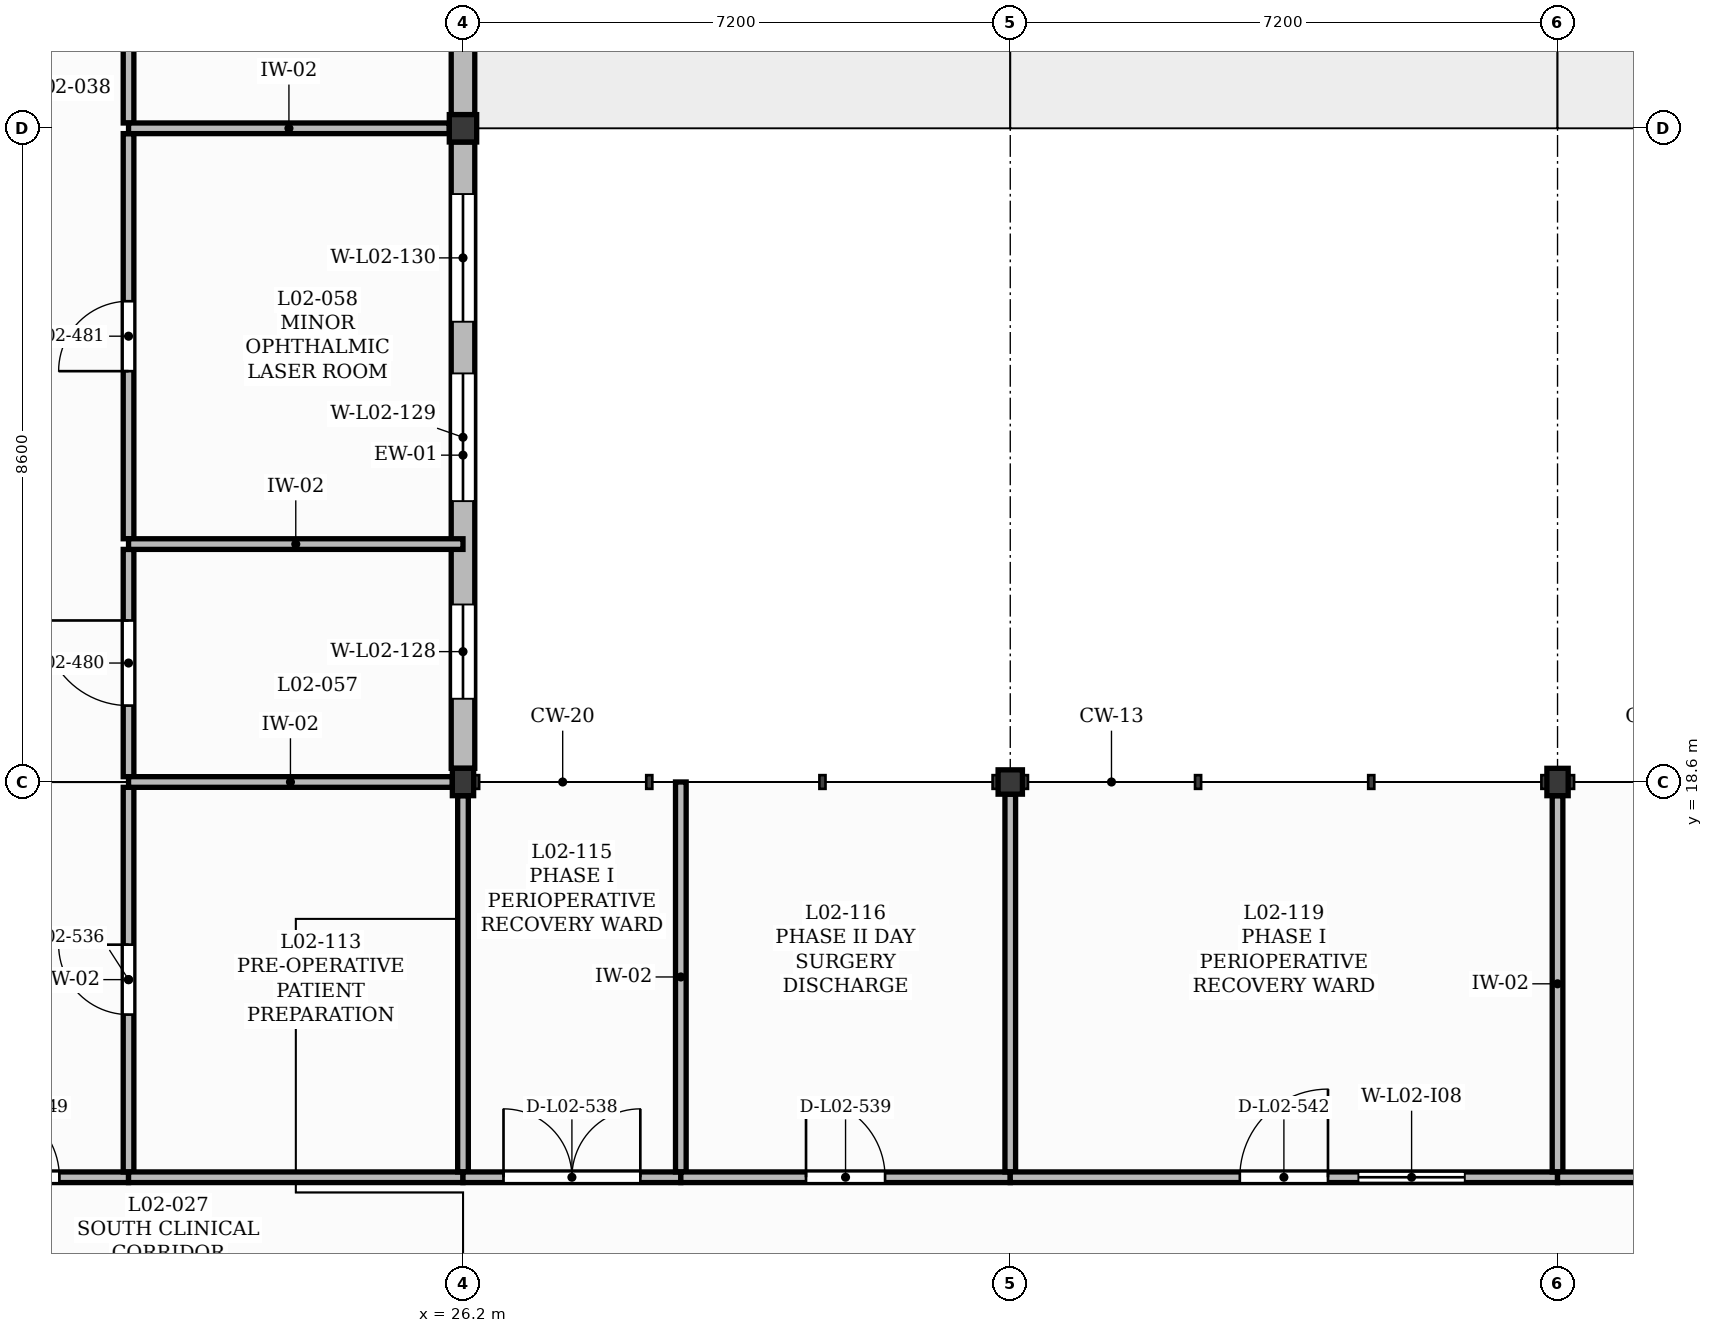
"""IFC4 building model, lengths in metres.
Left out: names, types, materials, properties, quantities, classifications, styles, units other than length and angle.
Written with IfcOpenShell. Run it as: python <this file> out.ifc"""

import sys

from ifc_helpers import new_model, si_unit, direction, frame, frame_2d, origin, origin_2d, place, context, subcontext, project, spatial, rectangle, extrude, element, fill, save


model = new_model("IFC4")
c1 = context("Model", 3, precision=1e-05, world=origin(), true_north=direction((0.0, 1.0)))
c2 = subcontext(c1, "Body", "Model", "MODEL_VIEW")
j1 = project(units=[si_unit("LENGTHUNIT", "METRE"), si_unit("PLANEANGLEUNIT", "RADIAN")], contexts=[c1])
p1 = place(None, origin())
s1 = spatial("IfcSite", under=j1, at=p1, CompositionType="ELEMENT")
p2 = place(p1, origin())
s2 = spatial("IfcBuilding", under=s1, at=p2, CompositionType="ELEMENT")
p3 = place(p2, frame((0.0, 0.0, 9.0)))
s3 = spatial("IfcBuildingStorey", under=s2, at=p3, CompositionType="ELEMENT", Elevation=9.0)
p4 = place(p3, frame((26.2, 18.6, 0.0), z_axis=(0.0, 0.0, 1.0), x_axis=(1.0, 0.0, 0.0)))
e1 = element("IfcColumn", 1, at=p4, inside=s3, PredefinedType="COLUMN", context=c2, shape_type="SweptSolid", body=[
    extrude(rectangle(XDim=0.28, YDim=0.36, at=origin_2d()), origin(), (0.0, 0.0, 1.0), 3.95),
])
p5 = place(p3, frame((26.2, 27.2, 0.0), z_axis=(0.0, 0.0, 1.0), x_axis=(1.0, 0.0, 0.0)))
e2 = element("IfcColumn", 2, at=p5, inside=s3, PredefinedType="COLUMN", context=c2, shape_type="SweptSolid", body=[
    extrude(rectangle(XDim=0.36, YDim=0.36, at=origin_2d()), origin(), (0.0, 0.0, 1.0), 3.95),
])
p6 = place(p3, frame((33.4, 18.6, 0.0), z_axis=(0.0, 0.0, 1.0), x_axis=(1.0, 0.0, 0.0)))
e3 = element("IfcColumn", 3, at=p6, inside=s3, PredefinedType="COLUMN", context=c2, shape_type="SweptSolid", body=[
    extrude(rectangle(XDim=0.32, YDim=0.32, at=origin_2d()), origin(), (0.0, 0.0, 1.0), 3.95),
])
p7 = place(p3, frame((40.6, 18.6, 0.0), z_axis=(0.0, 0.0, 1.0), x_axis=(1.0, 0.0, 0.0)))
e4 = element("IfcColumn", 4, at=p7, inside=s3, PredefinedType="COLUMN", context=c2, shape_type="SweptSolid", body=[
    extrude(rectangle(XDim=0.28, YDim=0.36, at=origin_2d()), origin(), (0.0, 0.0, 1.0), 3.95),
])
p8 = place(p3, frame((26.2, 18.78, 0.0), z_axis=(0.0, 0.0, 1.0), x_axis=(0.0, 1.0, 0.0)))
e5 = element("IfcWall", 5, at=p8, inside=s3, PredefinedType="SOLIDWALL", context=c2, shape_type="SweptSolid", body=[
    extrude(rectangle(XDim=8.24, YDim=0.31, at=frame_2d((4.12, 0.0))), origin(), (0.0, 0.0, 1.0), 3.49),
])
p9 = place(p8, frame((0.915, 0.0, 1.0)))
e6 = element("IfcOpeningElement", 6, at=p9, cuts=e5, PredefinedType="OPENING", context=c2, shape_type="SweptSolid", body=[
    extrude(rectangle(XDim=1.24, YDim=1.8, at=frame_2d((0.62, 0.9))), frame((0.0, 0.165, 0.0), z_axis=(0.0, -1.0, 0.0), x_axis=(1.0, 0.0, 0.0)), (0.0, 0.0, 1.0), 0.33),
])
p10 = place(p8, frame((3.515, 0.0, 1.5)))
e7 = element("IfcOpeningElement", 7, at=p10, cuts=e5, PredefinedType="OPENING", context=c2, shape_type="SweptSolid", body=[
    extrude(rectangle(XDim=1.68, YDim=1.25, at=frame_2d((0.84, 0.625))), frame((0.0, 0.165, 0.0), z_axis=(0.0, -1.0, 0.0), x_axis=(1.0, 0.0, 0.0)), (0.0, 0.0, 1.0), 0.33),
])
p11 = place(p8, frame((5.875, 0.0, 1.5)))
e8 = element("IfcOpeningElement", 8, at=p11, cuts=e5, PredefinedType="OPENING", context=c2, shape_type="SweptSolid", body=[
    extrude(rectangle(XDim=1.68, YDim=1.25, at=frame_2d((0.84, 0.625))), frame((0.0, 0.165, 0.0), z_axis=(0.0, -1.0, 0.0), x_axis=(1.0, 0.0, 0.0)), (0.0, 0.0, 1.0), 0.33),
])
p12 = place(p3, frame((26.2, 27.38, 0.0), z_axis=(0.0, 0.0, 1.0), x_axis=(0.0, 1.0, 0.0)))
e9 = element("IfcWall", 9, at=p12, inside=s3, PredefinedType="SOLIDWALL", context=c2, shape_type="SweptSolid", body=[
    extrude(rectangle(XDim=9.24, YDim=0.31, at=frame_2d((4.62, 0.0))), origin(), (0.0, 0.0, 1.0), 3.49),
])
p13 = place(p3, frame((19.0, 13.4, 0.0), z_axis=(0.0, 0.0, 1.0), x_axis=(1.0, 0.0, 0.0)))
e10 = element("IfcWall", 10, at=p13, inside=s3, PredefinedType="PARTITIONING", context=c2, shape_type="SweptSolid", body=[
    extrude(rectangle(XDim=2.8, YDim=0.14, at=frame_2d((1.4, 0.0))), origin(), (0.0, 0.0, 1.0), 3.96),
])
p14 = place(p13, frame((0.91, 0.0, 0.0)))
e11 = element("IfcOpeningElement", 11, at=p14, cuts=e10, PredefinedType="OPENING", context=c2, shape_type="SweptSolid", body=[
    extrude(rectangle(XDim=0.98, YDim=2.15, at=frame_2d((0.49, 1.075))), frame((0.0, 0.08, 0.0), z_axis=(0.0, -1.0, 0.0), x_axis=(1.0, 0.0, 0.0)), (0.0, 0.0, 1.0), 0.16),
])
p15 = place(p3, frame((21.8, 13.47, 0.0), z_axis=(0.0, 0.0, 1.0), x_axis=(0.0, 1.0, 0.0)))
e12 = element("IfcWall", 12, at=p15, inside=s3, PredefinedType="PARTITIONING", context=c2, shape_type="SweptSolid", body=[
    extrude(rectangle(XDim=5.06, YDim=0.14, at=frame_2d((2.53, 0.0))), origin(), (0.0, 0.0, 1.0), 3.91),
])
p16 = place(p15, frame((2.07, 0.0, 0.0)))
e13 = element("IfcOpeningElement", 13, at=p16, cuts=e12, PredefinedType="OPENING", context=c2, shape_type="SweptSolid", body=[
    extrude(rectangle(XDim=0.92, YDim=2.1, at=frame_2d((0.46, 1.05))), frame((0.0, 0.08, 0.0), z_axis=(0.0, -1.0, 0.0), x_axis=(1.0, 0.0, 0.0)), (0.0, 0.0, 1.0), 0.16),
])
p17 = place(p3, frame((21.8, 13.4, 0.0), z_axis=(0.0, 0.0, 1.0), x_axis=(1.0, 0.0, 0.0)))
e14 = element("IfcWall", 14, at=p17, inside=s3, PredefinedType="PARTITIONING", context=c2, shape_type="SweptSolid", body=[
    extrude(rectangle(XDim=4.4, YDim=0.14, at=frame_2d((2.2, 0.0))), origin(), (0.0, 0.0, 1.0), 3.91),
])
p18 = place(p3, frame((21.8, 18.67, 0.0), z_axis=(0.0, 0.0, 1.0), x_axis=(0.0, 1.0, 0.0)))
e15 = element("IfcWall", 15, at=p18, inside=s3, PredefinedType="PARTITIONING", context=c2, shape_type="SweptSolid", body=[
    extrude(rectangle(XDim=2.99, YDim=0.14, at=frame_2d((1.495, 0.0))), origin(), (0.0, 0.0, 1.0), 3.96),
])
p19 = place(p18, frame((0.935, 0.0, 0.0)))
e16 = element("IfcOpeningElement", 16, at=p19, cuts=e15, PredefinedType="OPENING", context=c2, shape_type="SweptSolid", body=[
    extrude(rectangle(XDim=1.12, YDim=2.15, at=frame_2d((0.56, 1.075))), frame((0.0, 0.08, 0.0), z_axis=(0.0, -1.0, 0.0), x_axis=(1.0, 0.0, 0.0)), (0.0, 0.0, 1.0), 0.16),
])
p20 = place(p3, frame((21.8, 18.6, 0.0), z_axis=(0.0, 0.0, 1.0), x_axis=(1.0, 0.0, 0.0)))
e17 = element("IfcWall", 17, at=p20, inside=s3, PredefinedType="PARTITIONING", context=c2, shape_type="SweptSolid", body=[
    extrude(rectangle(XDim=4.26, YDim=0.14, at=frame_2d((2.13, 0.0))), origin(), (0.0, 0.0, 1.0), 3.49),
])
p21 = place(p3, frame((21.8, 21.8, 0.0), z_axis=(0.0, 0.0, 1.0), x_axis=(0.0, 1.0, 0.0)))
e18 = element("IfcWall", 18, at=p21, inside=s3, PredefinedType="PARTITIONING", context=c2, shape_type="SweptSolid", body=[
    extrude(rectangle(XDim=5.33, YDim=0.14, at=frame_2d((2.665, 0.0))), origin(), (0.0, 0.0, 1.0), 3.96),
])
p22 = place(p21, frame((2.205, 0.0, 0.0)))
e19 = element("IfcOpeningElement", 19, at=p22, cuts=e18, PredefinedType="OPENING", context=c2, shape_type="SweptSolid", body=[
    extrude(rectangle(XDim=0.92, YDim=2.1, at=frame_2d((0.46, 1.05))), frame((0.0, 0.08, 0.0), z_axis=(0.0, -1.0, 0.0), x_axis=(1.0, 0.0, 0.0)), (0.0, 0.0, 1.0), 0.16),
])
p23 = place(p3, frame((21.8, 21.73, 0.0), z_axis=(0.0, 0.0, 1.0), x_axis=(1.0, 0.0, 0.0)))
e20 = element("IfcWall", 20, at=p23, inside=s3, PredefinedType="PARTITIONING", context=c2, shape_type="SweptSolid", body=[
    extrude(rectangle(XDim=4.4, YDim=0.14, at=frame_2d((2.2, 0.0))), origin(), (0.0, 0.0, 1.0), 3.96),
])
p24 = place(p3, frame((21.8, 27.27, 0.0), z_axis=(0.0, 0.0, 1.0), x_axis=(0.0, 1.0, 0.0)))
e21 = element("IfcWall", 21, at=p24, inside=s3, PredefinedType="PARTITIONING", context=c2, shape_type="SweptSolid", body=[
    extrude(rectangle(XDim=5.476, YDim=0.14, at=frame_2d((2.738, 0.0))), origin(), (0.0, 0.0, 1.0), 3.96),
])
p25 = place(p24, frame((2.158, 0.0, 0.0)))
e22 = element("IfcOpeningElement", 22, at=p25, cuts=e21, PredefinedType="OPENING", context=c2, shape_type="SweptSolid", body=[
    extrude(rectangle(XDim=1.16, YDim=2.1, at=frame_2d((0.58, 1.05))), frame((0.0, 0.08, 0.0), z_axis=(0.0, -1.0, 0.0), x_axis=(1.0, 0.0, 0.0)), (0.0, 0.0, 1.0), 0.16),
])
p26 = place(p3, frame((21.8, 27.2, 0.0), z_axis=(0.0, 0.0, 1.0), x_axis=(1.0, 0.0, 0.0)))
e23 = element("IfcWall", 23, at=p26, inside=s3, PredefinedType="PARTITIONING", context=c2, shape_type="SweptSolid", body=[
    extrude(rectangle(XDim=4.22, YDim=0.14, at=frame_2d((2.11, 0.0))), origin(), (0.0, 0.0, 1.0), 3.49),
])
p27 = place(p3, frame((26.2, 13.47, 0.0), z_axis=(0.0, 0.0, 1.0), x_axis=(0.0, 1.0, 0.0)))
e24 = element("IfcWall", 24, at=p27, inside=s3, PredefinedType="PARTITIONING", context=c2, shape_type="SweptSolid", body=[
    extrude(rectangle(XDim=4.95, YDim=0.14, at=frame_2d((2.475, 0.0))), origin(), (0.0, 0.0, 1.0), 3.49),
])
p28 = place(p3, frame((26.2, 13.4, 0.0), z_axis=(0.0, 0.0, 1.0), x_axis=(1.0, 0.0, 0.0)))
e25 = element("IfcWall", 25, at=p28, inside=s3, PredefinedType="PARTITIONING", context=c2, shape_type="SweptSolid", body=[
    extrude(rectangle(XDim=2.866, YDim=0.14, at=frame_2d((1.433, 0.0))), origin(), (0.0, 0.0, 1.0), 3.91),
])
p29 = place(p28, frame((0.533, 0.0, 0.0)))
e26 = element("IfcOpeningElement", 26, at=p29, cuts=e25, PredefinedType="OPENING", context=c2, shape_type="SweptSolid", body=[
    extrude(rectangle(XDim=1.8, YDim=2.3, at=frame_2d((0.9, 1.15))), frame((0.0, 0.08, 0.0), z_axis=(0.0, -1.0, 0.0), x_axis=(1.0, 0.0, 0.0)), (0.0, 0.0, 1.0), 0.16),
])
p30 = place(p3, frame((29.066, 13.47, 0.0), z_axis=(0.0, 0.0, 1.0), x_axis=(0.0, 1.0, 0.0)))
e27 = element("IfcWall", 27, at=p30, inside=s3, PredefinedType="PARTITIONING", context=c2, shape_type="SweptSolid", body=[
    extrude(rectangle(XDim=5.13, YDim=0.14, at=frame_2d((2.565, 0.0))), origin(), (0.0, 0.0, 1.0), 3.91),
])
p31 = place(p3, frame((29.066, 13.4, 0.0), z_axis=(0.0, 0.0, 1.0), x_axis=(1.0, 0.0, 0.0)))
e28 = element("IfcWall", 28, at=p31, inside=s3, PredefinedType="PARTITIONING", context=c2, shape_type="SweptSolid", body=[
    extrude(rectangle(XDim=4.334, YDim=0.14, at=frame_2d((2.167, 0.0))), origin(), (0.0, 0.0, 1.0), 3.91),
])
p32 = place(p31, frame((1.647, 0.0, 0.0)))
e29 = element("IfcOpeningElement", 29, at=p32, cuts=e28, PredefinedType="OPENING", context=c2, shape_type="SweptSolid", body=[
    extrude(rectangle(XDim=1.04, YDim=2.1, at=frame_2d((0.52, 1.05))), frame((0.0, 0.08, 0.0), z_axis=(0.0, -1.0, 0.0), x_axis=(1.0, 0.0, 0.0)), (0.0, 0.0, 1.0), 0.16),
])
p33 = place(p3, frame((33.4, 13.47, 0.0), z_axis=(0.0, 0.0, 1.0), x_axis=(0.0, 1.0, 0.0)))
e30 = element("IfcWall", 30, at=p33, inside=s3, PredefinedType="PARTITIONING", context=c2, shape_type="SweptSolid", body=[
    extrude(rectangle(XDim=4.97, YDim=0.14, at=frame_2d((2.485, 0.0))), origin(), (0.0, 0.0, 1.0), 3.49),
])
p34 = place(p3, frame((33.4, 13.4, 0.0), z_axis=(0.0, 0.0, 1.0), x_axis=(1.0, 0.0, 0.0)))
e31 = element("IfcWall", 31, at=p34, inside=s3, PredefinedType="PARTITIONING", context=c2, shape_type="SweptSolid", body=[
    extrude(rectangle(XDim=7.2, YDim=0.14, at=frame_2d((3.6, 0.0))), origin(), (0.0, 0.0, 1.0), 3.91),
])
p35 = place(p34, frame((3.02, 0.0, 0.0)))
e32 = element("IfcOpeningElement", 32, at=p35, cuts=e31, PredefinedType="OPENING", context=c2, shape_type="SweptSolid", body=[
    extrude(rectangle(XDim=1.16, YDim=2.1, at=frame_2d((0.58, 1.05))), frame((0.0, 0.08, 0.0), z_axis=(0.0, -1.0, 0.0), x_axis=(1.0, 0.0, 0.0)), (0.0, 0.0, 1.0), 0.16),
])
p36 = place(p34, frame((4.58, 0.0, 1.05)))
e33 = element("IfcOpeningElement", 33, at=p36, cuts=e31, PredefinedType="OPENING", context=c2, shape_type="SweptSolid", body=[
    extrude(rectangle(XDim=1.4, YDim=1.1, at=frame_2d((0.7, 0.55))), frame((0.0, 0.08, 0.0), z_axis=(0.0, -1.0, 0.0), x_axis=(1.0, 0.0, 0.0)), (0.0, 0.0, 1.0), 0.16),
])
p37 = place(p3, frame((40.6, 13.47, 0.0), z_axis=(0.0, 0.0, 1.0), x_axis=(0.0, 1.0, 0.0)))
e34 = element("IfcWall", 34, at=p37, inside=s3, PredefinedType="PARTITIONING", context=c2, shape_type="SweptSolid", body=[
    extrude(rectangle(XDim=4.95, YDim=0.14, at=frame_2d((2.475, 0.0))), origin(), (0.0, 0.0, 1.0), 3.49),
])
p38 = place(p3, frame((40.6, 13.4, 0.0), z_axis=(0.0, 0.0, 1.0), x_axis=(1.0, 0.0, 0.0)))
e35 = element("IfcWall", 35, at=p38, inside=s3, PredefinedType="PARTITIONING", context=c2, shape_type="SweptSolid", body=[
    extrude(rectangle(XDim=4.522, YDim=0.14, at=frame_2d((2.261, 0.0))), origin(), (0.0, 0.0, 1.0), 3.91),
])
p39 = place(p38, frame((1.361, 0.0, 0.0)))
e36 = element("IfcOpeningElement", 36, at=p39, cuts=e35, PredefinedType="OPENING", context=c2, shape_type="SweptSolid", body=[
    extrude(rectangle(XDim=1.8, YDim=2.3, at=frame_2d((0.9, 1.15))), frame((0.0, 0.08, 0.0), z_axis=(0.0, -1.0, 0.0), x_axis=(1.0, 0.0, 0.0)), (0.0, 0.0, 1.0), 0.16),
])
p40 = place(p9, origin())
e37 = element("IfcWindow", 37, at=p40, inside=s3, PartitioningType="SINGLE_PANEL", PredefinedType="WINDOW", context=c2, shape_type="SweptSolid", body=[
    extrude(rectangle(XDim=1.24, YDim=1.8, at=frame_2d((0.62, 0.9))), frame((0.0, 0.03, 0.0), z_axis=(0.0, -1.0, 0.0), x_axis=(1.0, 0.0, 0.0)), (0.0, 0.0, 1.0), 0.06),
])
fill(e6, e37)
p41 = place(p10, origin())
e38 = element("IfcWindow", 38, at=p41, inside=s3, PartitioningType="DOUBLE_PANEL_VERTICAL", PredefinedType="WINDOW", context=c2, shape_type="SweptSolid", body=[
    extrude(rectangle(XDim=1.68, YDim=1.25, at=frame_2d((0.84, 0.625))), frame((0.0, 0.03, 0.0), z_axis=(0.0, -1.0, 0.0), x_axis=(1.0, 0.0, 0.0)), (0.0, 0.0, 1.0), 0.06),
])
fill(e7, e38)
p42 = place(p11, origin())
e39 = element("IfcWindow", 39, at=p42, inside=s3, PartitioningType="DOUBLE_PANEL_VERTICAL", PredefinedType="WINDOW", context=c2, shape_type="SweptSolid", body=[
    extrude(rectangle(XDim=1.68, YDim=1.25, at=frame_2d((0.84, 0.625))), frame((0.0, 0.03, 0.0), z_axis=(0.0, -1.0, 0.0), x_axis=(1.0, 0.0, 0.0)), (0.0, 0.0, 1.0), 0.06),
])
fill(e8, e39)
p43 = place(p14, origin())
e40 = element("IfcDoor", 40, at=p43, inside=s3, OperationType="SINGLE_SWING_LEFT", PredefinedType="DOOR", context=c2, shape_type="SweptSolid", body=[
    extrude(rectangle(XDim=0.98, YDim=2.15, at=frame_2d((0.49, 1.075))), frame((0.0, 0.025, 0.0), z_axis=(0.0, -1.0, 0.0), x_axis=(1.0, 0.0, 0.0)), (0.0, 0.0, 1.0), 0.05),
])
fill(e11, e40)
p44 = place(p19, origin())
e41 = element("IfcDoor", 41, at=p44, inside=s3, OperationType="SINGLE_SWING_RIGHT", PredefinedType="DOOR", context=c2, shape_type="SweptSolid", body=[
    extrude(rectangle(XDim=1.12, YDim=2.15, at=frame_2d((0.56, 1.075))), frame((0.0, 0.025, 0.0), z_axis=(0.0, -1.0, 0.0), x_axis=(1.0, 0.0, 0.0)), (0.0, 0.0, 1.0), 0.05),
])
fill(e16, e41)
p45 = place(p22, origin())
e42 = element("IfcDoor", 42, at=p45, inside=s3, OperationType="SINGLE_SWING_LEFT", PredefinedType="DOOR", context=c2, shape_type="SweptSolid", body=[
    extrude(rectangle(XDim=0.92, YDim=2.1, at=frame_2d((0.46, 1.05))), frame((0.0, 0.025, 0.0), z_axis=(0.0, -1.0, 0.0), x_axis=(1.0, 0.0, 0.0)), (0.0, 0.0, 1.0), 0.05),
])
fill(e19, e42)
p46 = place(p16, origin())
e43 = element("IfcDoor", 43, at=p46, inside=s3, OperationType="SINGLE_SWING_RIGHT", PredefinedType="DOOR", context=c2, shape_type="SweptSolid", body=[
    extrude(rectangle(XDim=0.92, YDim=2.1, at=frame_2d((0.46, 1.05))), frame((0.0, 0.025, 0.0), z_axis=(0.0, -1.0, 0.0), x_axis=(1.0, 0.0, 0.0)), (0.0, 0.0, 1.0), 0.05),
])
fill(e13, e43)
p47 = place(p29, origin())
e44 = element("IfcDoor", 44, at=p47, inside=s3, OperationType="DOUBLE_DOOR_SINGLE_SWING", PredefinedType="DOOR", context=c2, shape_type="SweptSolid", body=[
    extrude(rectangle(XDim=1.8, YDim=2.3, at=frame_2d((0.9, 1.15))), frame((0.0, 0.025, 0.0), z_axis=(0.0, -1.0, 0.0), x_axis=(1.0, 0.0, 0.0)), (0.0, 0.0, 1.0), 0.05),
])
fill(e26, e44)
p48 = place(p32, origin())
e45 = element("IfcDoor", 45, at=p48, inside=s3, OperationType="SINGLE_SWING_LEFT", PredefinedType="DOOR", context=c2, shape_type="SweptSolid", body=[
    extrude(rectangle(XDim=1.04, YDim=2.1, at=frame_2d((0.52, 1.05))), frame((0.0, 0.025, 0.0), z_axis=(0.0, -1.0, 0.0), x_axis=(1.0, 0.0, 0.0)), (0.0, 0.0, 1.0), 0.05),
])
fill(e29, e45)
p49 = place(p35, origin())
e46 = element("IfcDoor", 46, at=p49, inside=s3, OperationType="SINGLE_SWING_RIGHT", PredefinedType="DOOR", context=c2, shape_type="SweptSolid", body=[
    extrude(rectangle(XDim=1.16, YDim=2.1, at=frame_2d((0.58, 1.05))), frame((0.0, 0.025, 0.0), z_axis=(0.0, -1.0, 0.0), x_axis=(1.0, 0.0, 0.0)), (0.0, 0.0, 1.0), 0.05),
])
fill(e32, e46)
p50 = place(p36, origin())
e47 = element("IfcWindow", 47, at=p50, inside=s3, PartitioningType="SINGLE_PANEL", PredefinedType="WINDOW", context=c2, shape_type="SweptSolid", body=[
    extrude(rectangle(XDim=1.4, YDim=1.1, at=frame_2d((0.7, 0.55))), frame((0.0, 0.03, 0.0), z_axis=(0.0, -1.0, 0.0), x_axis=(1.0, 0.0, 0.0)), (0.0, 0.0, 1.0), 0.06),
])
fill(e33, e47)
save(model, sys.argv[1])
